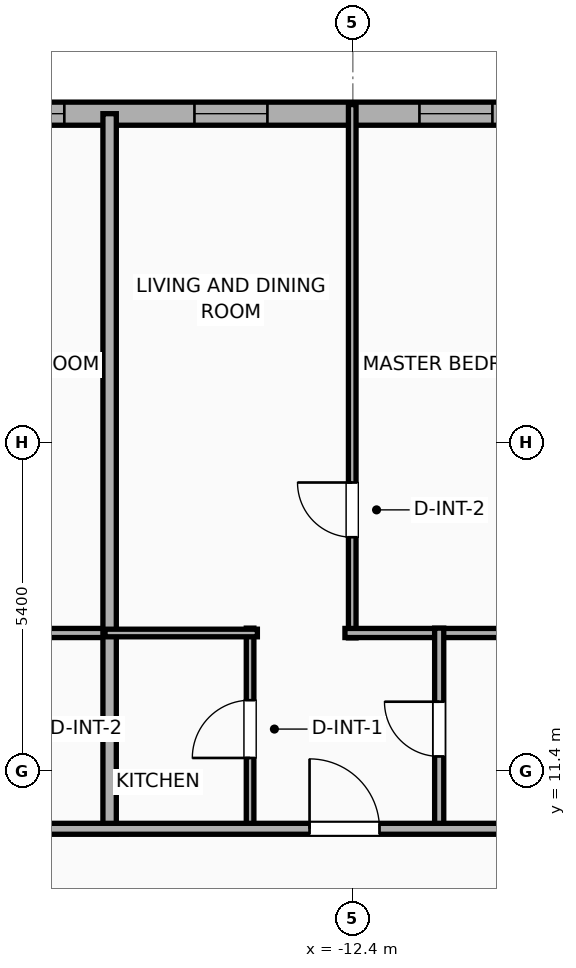
"""IFC4 building model, lengths in metres.
Left out: names, types, materials, properties, quantities, classifications, styles, units other than length and angle.
Written with IfcOpenShell. Run it as: python <this file> out.ifc"""

import sys

from ifc_helpers import new_model, si_unit, direction, frame, frame_2d, origin, place, context, subcontext, project, spatial, rectangle, extrude, element, fill, save


model = new_model("IFC4")
c1 = context("Model", 3, precision=1e-05, world=origin(), true_north=direction((0.0, 1.0)))
c2 = subcontext(c1, "Body", "Model", "MODEL_VIEW")
j1 = project(units=[si_unit("LENGTHUNIT", "METRE"), si_unit("PLANEANGLEUNIT", "RADIAN")], contexts=[c1])
p1 = place(None, origin())
s1 = spatial("IfcSite", under=j1, at=p1, CompositionType="ELEMENT")
p2 = place(p1, origin())
s2 = spatial("IfcBuilding", under=s1, at=p2, CompositionType="ELEMENT")
p3 = place(p2, frame((0.0, 0.0, 57.2)))
s3 = spatial("IfcBuildingStorey", under=s2, at=p3, CompositionType="ELEMENT", Elevation=57.2)
p4 = place(p3, frame((-29.581, 22.21, 0.0), z_axis=(0.0, 0.0, 1.0), x_axis=(1.0, 0.0, 0.0)))
e1 = element("IfcWall", 1, at=p4, inside=s3, PredefinedType="ELEMENTEDWALL", context=c2, shape_type="SweptSolid", body=[
    extrude(rectangle(XDim=51.963, YDim=0.38, at=frame_2d((25.981, 0.0))), origin(), (0.0, 0.0, 1.0), 3.65),
])
p5 = place(p4, frame((6.61, 0.0, 0.75)))
e2 = element("IfcOpeningElement", 2, at=p5, cuts=e1, PredefinedType="OPENING", context=c2, shape_type="SweptSolid", body=[
    extrude(rectangle(XDim=2.4, YDim=2.1, at=frame_2d((1.2, 1.05))), frame((0.0, 0.2, 0.0), z_axis=(0.0, -1.0, 0.0), x_axis=(1.0, 0.0, 0.0)), (0.0, 0.0, 1.0), 0.4),
])
p6 = place(p4, frame((24.781, 0.0, 0.75)))
e3 = element("IfcOpeningElement", 3, at=p6, cuts=e1, PredefinedType="OPENING", context=c2, shape_type="SweptSolid", body=[
    extrude(rectangle(XDim=2.4, YDim=2.1, at=frame_2d((1.2, 1.05))), frame((0.0, 0.2, 0.0), z_axis=(0.0, -1.0, 0.0), x_axis=(1.0, 0.0, 0.0)), (0.0, 0.0, 1.0), 0.4),
])
p7 = place(p4, frame((42.952, 0.0, 0.75)))
e4 = element("IfcOpeningElement", 4, at=p7, cuts=e1, PredefinedType="OPENING", context=c2, shape_type="SweptSolid", body=[
    extrude(rectangle(XDim=2.4, YDim=2.1, at=frame_2d((1.2, 1.05))), frame((0.0, 0.2, 0.0), z_axis=(0.0, -1.0, 0.0), x_axis=(1.0, 0.0, 0.0)), (0.0, 0.0, 1.0), 0.4),
])
p8 = place(p4, frame((3.476, 0.0, 0.75)))
e5 = element("IfcOpeningElement", 5, at=p8, cuts=e1, PredefinedType="OPENING", context=c2, shape_type="SweptSolid", body=[
    extrude(rectangle(XDim=1.2, YDim=2.05, at=frame_2d((0.6, 1.025))), frame((0.0, 0.2, 0.0), z_axis=(0.0, -1.0, 0.0), x_axis=(1.0, 0.0, 0.0)), (0.0, 0.0, 1.0), 0.4),
])
p9 = place(p4, frame((11.236, 0.0, 0.75)))
e6 = element("IfcOpeningElement", 6, at=p9, cuts=e1, PredefinedType="OPENING", context=c2, shape_type="SweptSolid", body=[
    extrude(rectangle(XDim=1.2, YDim=2.05, at=frame_2d((0.6, 1.025))), frame((0.0, 0.2, 0.0), z_axis=(0.0, -1.0, 0.0), x_axis=(1.0, 0.0, 0.0)), (0.0, 0.0, 1.0), 0.4),
])
p10 = place(p4, frame((14.576, 0.0, 0.75)))
e7 = element("IfcOpeningElement", 7, at=p10, cuts=e1, PredefinedType="OPENING", context=c2, shape_type="SweptSolid", body=[
    extrude(rectangle(XDim=1.2, YDim=2.05, at=frame_2d((0.6, 1.025))), frame((0.0, 0.2, 0.0), z_axis=(0.0, -1.0, 0.0), x_axis=(1.0, 0.0, 0.0)), (0.0, 0.0, 1.0), 0.4),
])
p11 = place(p4, frame((18.276, 0.0, 0.75)))
e8 = element("IfcOpeningElement", 8, at=p11, cuts=e1, PredefinedType="OPENING", context=c2, shape_type="SweptSolid", body=[
    extrude(rectangle(XDim=1.2, YDim=2.05, at=frame_2d((0.6, 1.025))), frame((0.0, 0.2, 0.0), z_axis=(0.0, -1.0, 0.0), x_axis=(1.0, 0.0, 0.0)), (0.0, 0.0, 1.0), 0.4),
])
p12 = place(p4, frame((21.976, 0.0, 0.75)))
e9 = element("IfcOpeningElement", 9, at=p12, cuts=e1, PredefinedType="OPENING", context=c2, shape_type="SweptSolid", body=[
    extrude(rectangle(XDim=1.2, YDim=2.05, at=frame_2d((0.6, 1.025))), frame((0.0, 0.2, 0.0), z_axis=(0.0, -1.0, 0.0), x_axis=(1.0, 0.0, 0.0)), (0.0, 0.0, 1.0), 0.4),
])
p13 = place(p4, frame((29.136, 0.0, 0.75)))
e10 = element("IfcOpeningElement", 10, at=p13, cuts=e1, PredefinedType="OPENING", context=c2, shape_type="SweptSolid", body=[
    extrude(rectangle(XDim=1.2, YDim=2.05, at=frame_2d((0.6, 1.025))), frame((0.0, 0.2, 0.0), z_axis=(0.0, -1.0, 0.0), x_axis=(1.0, 0.0, 0.0)), (0.0, 0.0, 1.0), 0.4),
])
p14 = place(p4, frame((33.076, 0.0, 0.75)))
e11 = element("IfcOpeningElement", 11, at=p14, cuts=e1, PredefinedType="OPENING", context=c2, shape_type="SweptSolid", body=[
    extrude(rectangle(XDim=1.2, YDim=2.05, at=frame_2d((0.6, 1.025))), frame((0.0, 0.2, 0.0), z_axis=(0.0, -1.0, 0.0), x_axis=(1.0, 0.0, 0.0)), (0.0, 0.0, 1.0), 0.4),
])
p15 = place(p4, frame((36.776, 0.0, 0.75)))
e12 = element("IfcOpeningElement", 12, at=p15, cuts=e1, PredefinedType="OPENING", context=c2, shape_type="SweptSolid", body=[
    extrude(rectangle(XDim=1.2, YDim=2.05, at=frame_2d((0.6, 1.025))), frame((0.0, 0.2, 0.0), z_axis=(0.0, -1.0, 0.0), x_axis=(1.0, 0.0, 0.0)), (0.0, 0.0, 1.0), 0.4),
])
p16 = place(p4, frame((39.931, 0.0, 0.75)))
e13 = element("IfcOpeningElement", 13, at=p16, cuts=e1, PredefinedType="OPENING", context=c2, shape_type="SweptSolid", body=[
    extrude(rectangle(XDim=0.85, YDim=2.05, at=frame_2d((0.425, 1.025))), frame((0.0, 0.2, 0.0), z_axis=(0.0, -1.0, 0.0), x_axis=(1.0, 0.0, 0.0)), (0.0, 0.0, 1.0), 0.4),
])
p17 = place(p4, frame((47.469, 0.0, 0.75)))
e14 = element("IfcOpeningElement", 14, at=p17, cuts=e1, PredefinedType="OPENING", context=c2, shape_type="SweptSolid", body=[
    extrude(rectangle(XDim=1.2, YDim=2.05, at=frame_2d((0.6, 1.025))), frame((0.0, 0.2, 0.0), z_axis=(0.0, -1.0, 0.0), x_axis=(1.0, 0.0, 0.0)), (0.0, 0.0, 1.0), 0.4),
])
p18 = place(p4, frame((49.581, 0.0, 0.75)))
e15 = element("IfcOpeningElement", 15, at=p18, cuts=e1, PredefinedType="OPENING", context=c2, shape_type="SweptSolid", body=[
    extrude(rectangle(XDim=1.2, YDim=2.05, at=frame_2d((0.6, 1.025))), frame((0.0, 0.2, 0.0), z_axis=(0.0, -1.0, 0.0), x_axis=(1.0, 0.0, 0.0)), (0.0, 0.0, 1.0), 0.4),
])
p19 = place(p3, frame((-19.93, 13.67, 0.0), z_axis=(0.0, 0.0, 1.0), x_axis=(1.0, 0.0, 0.0)))
e16 = element("IfcWall", 16, at=p19, inside=s3, PredefinedType="PLUMBINGWALL", context=c2, shape_type="SweptSolid", body=[
    extrude(rectangle(XDim=3.605, YDim=0.15, at=frame_2d((1.802, 0.0))), origin(), (0.0, 0.0, 1.0), 3.65),
])
p20 = place(p3, frame((-16.4, 10.37, 0.0), z_axis=(0.0, 0.0, 1.0), x_axis=(0.0, 1.0, 0.0)))
e17 = element("IfcWall", 17, at=p20, inside=s3, PredefinedType="PARTITIONING", context=c2, shape_type="SweptSolid", body=[
    extrude(rectangle(XDim=11.84, YDim=0.22, at=frame_2d((5.92, 0.0))), origin(), (0.0, 0.0, 1.0), 3.65),
])
p21 = place(p3, frame((-12.41, 13.59, 0.0), z_axis=(0.0, 0.0, 1.0), x_axis=(0.0, 1.0, 0.0)))
e18 = element("IfcWall", 18, at=p21, inside=s3, PredefinedType="PARTITIONING", context=c2, shape_type="SweptSolid", body=[
    extrude(rectangle(XDim=8.77, YDim=0.125, at=frame_2d((4.385, 0.0))), origin(), (0.0, 0.0, 1.0), 3.65),
])
p22 = place(p21, frame((1.655, 0.0, 0.0)))
e19 = element("IfcOpeningElement", 19, at=p22, cuts=e18, PredefinedType="OPENING", context=c2, shape_type="SweptSolid", body=[
    extrude(rectangle(XDim=0.9, YDim=2.05, at=frame_2d((0.45, 1.025))), frame((0.0, 0.073, 0.0), z_axis=(0.0, -1.0, 0.0), x_axis=(1.0, 0.0, 0.0)), (0.0, 0.0, 1.0), 0.145),
])
p23 = place(p3, frame((-12.53, 13.67, 0.0), z_axis=(0.0, 0.0, 1.0), x_axis=(1.0, 0.0, 0.0)))
e20 = element("IfcWall", 20, at=p23, inside=s3, PredefinedType="PLUMBINGWALL", context=c2, shape_type="SweptSolid", body=[
    extrude(rectangle(XDim=3.605, YDim=0.15, at=frame_2d((1.802, 0.0))), origin(), (0.0, 0.0, 1.0), 3.65),
])
p24 = place(p3, frame((-14.09, 10.43, 0.0), z_axis=(0.0, 0.0, 1.0), x_axis=(0.0, 1.0, 0.0)))
e21 = element("IfcWall", 21, at=p24, inside=s3, PredefinedType="PARTITIONING", context=c2, shape_type="SweptSolid", body=[
    extrude(rectangle(XDim=3.32, YDim=0.125, at=frame_2d((1.66, 0.0))), origin(), (0.0, 0.0, 1.0), 3.65),
])
p25 = place(p24, frame((1.185, 0.0, 0.0)))
e22 = element("IfcOpeningElement", 22, at=p25, cuts=e21, PredefinedType="OPENING", context=c2, shape_type="SweptSolid", body=[
    extrude(rectangle(XDim=0.95, YDim=2.05, at=frame_2d((0.475, 1.025))), frame((0.0, 0.073, 0.0), z_axis=(0.0, -1.0, 0.0), x_axis=(1.0, 0.0, 0.0)), (0.0, 0.0, 1.0), 0.145),
])
p26 = place(p3, frame((-16.475, 13.67, 0.0), z_axis=(0.0, 0.0, 1.0), x_axis=(1.0, 0.0, 0.0)))
e23 = element("IfcWall", 23, at=p26, inside=s3, PredefinedType="PARTITIONING", context=c2, shape_type="SweptSolid", body=[
    extrude(rectangle(XDim=2.505, YDim=0.125, at=frame_2d((1.252, 0.0))), origin(), (0.0, 0.0, 1.0), 3.65),
])
p27 = place(p3, frame((-10.98, 10.43, 0.0), z_axis=(0.0, 0.0, 1.0), x_axis=(0.0, 1.0, 0.0)))
e24 = element("IfcWall", 24, at=p27, inside=s3, PredefinedType="PLUMBINGWALL", context=c2, shape_type="SweptSolid", body=[
    extrude(rectangle(XDim=3.32, YDim=0.15, at=frame_2d((1.66, 0.0))), origin(), (0.0, 0.0, 1.0), 2.94),
])
p28 = place(p27, frame((1.21, 0.0, 0.0)))
e25 = element("IfcOpeningElement", 25, at=p28, cuts=e24, PredefinedType="OPENING", context=c2, shape_type="SweptSolid", body=[
    extrude(rectangle(XDim=0.9, YDim=2.05, at=frame_2d((0.45, 1.025))), frame((0.0, 0.085, 0.0), z_axis=(0.0, -1.0, 0.0), x_axis=(1.0, 0.0, 0.0)), (0.0, 0.0, 1.0), 0.17),
])
p29 = place(p3, frame((-33.41, 10.45, 0.0), z_axis=(0.0, 0.0, 1.0), x_axis=(1.0, 0.0, 0.0)))
e26 = element("IfcWall", 26, at=p29, inside=s3, PredefinedType="PARTITIONING", context=c2, shape_type="SweptSolid", body=[
    extrude(rectangle(XDim=59.62, YDim=0.18, at=frame_2d((29.81, 0.0))), origin(), (0.0, 0.0, 1.0), 3.65),
])
p30 = place(p29, frame((4.529, 0.0, 0.0)))
e27 = element("IfcOpeningElement", 27, at=p30, cuts=e26, PredefinedType="OPENING", context=c2, shape_type="SweptSolid", body=[
    extrude(rectangle(XDim=1.15, YDim=2.05, at=frame_2d((0.575, 1.025))), frame((0.0, 0.1, 0.0), z_axis=(0.0, -1.0, 0.0), x_axis=(1.0, 0.0, 0.0)), (0.0, 0.0, 1.0), 0.2),
])
p31 = place(p29, frame((12.899, 0.0, 0.0)))
e28 = element("IfcOpeningElement", 28, at=p31, cuts=e26, PredefinedType="OPENING", context=c2, shape_type="SweptSolid", body=[
    extrude(rectangle(XDim=1.15, YDim=2.05, at=frame_2d((0.575, 1.025))), frame((0.0, 0.1, 0.0), z_axis=(0.0, -1.0, 0.0), x_axis=(1.0, 0.0, 0.0)), (0.0, 0.0, 1.0), 0.2),
])
p32 = place(p29, frame((20.298, 0.0, 0.0)))
e29 = element("IfcOpeningElement", 29, at=p32, cuts=e26, PredefinedType="OPENING", context=c2, shape_type="SweptSolid", body=[
    extrude(rectangle(XDim=1.15, YDim=2.05, at=frame_2d((0.575, 1.025))), frame((0.0, 0.1, 0.0), z_axis=(0.0, -1.0, 0.0), x_axis=(1.0, 0.0, 0.0)), (0.0, 0.0, 1.0), 0.2),
])
p33 = place(p29, frame((27.703, 0.0, 0.0)))
e30 = element("IfcOpeningElement", 30, at=p33, cuts=e26, PredefinedType="OPENING", context=c2, shape_type="SweptSolid", body=[
    extrude(rectangle(XDim=1.15, YDim=2.05, at=frame_2d((0.575, 1.025))), frame((0.0, 0.1, 0.0), z_axis=(0.0, -1.0, 0.0), x_axis=(1.0, 0.0, 0.0)), (0.0, 0.0, 1.0), 0.2),
])
p34 = place(p29, frame((35.102, 0.0, 0.0)))
e31 = element("IfcOpeningElement", 31, at=p34, cuts=e26, PredefinedType="OPENING", context=c2, shape_type="SweptSolid", body=[
    extrude(rectangle(XDim=1.15, YDim=2.05, at=frame_2d((0.575, 1.025))), frame((0.0, 0.1, 0.0), z_axis=(0.0, -1.0, 0.0), x_axis=(1.0, 0.0, 0.0)), (0.0, 0.0, 1.0), 0.2),
])
p35 = place(p29, frame((42.5, 0.0, 0.0)))
e32 = element("IfcOpeningElement", 32, at=p35, cuts=e26, PredefinedType="OPENING", context=c2, shape_type="SweptSolid", body=[
    extrude(rectangle(XDim=1.15, YDim=2.05, at=frame_2d((0.575, 1.025))), frame((0.0, 0.1, 0.0), z_axis=(0.0, -1.0, 0.0), x_axis=(1.0, 0.0, 0.0)), (0.0, 0.0, 1.0), 0.2),
])
p36 = place(p29, frame((48.099, 0.0, 0.0)))
e33 = element("IfcOpeningElement", 33, at=p36, cuts=e26, PredefinedType="OPENING", context=c2, shape_type="SweptSolid", body=[
    extrude(rectangle(XDim=1.15, YDim=2.05, at=frame_2d((0.575, 1.025))), frame((0.0, 0.1, 0.0), z_axis=(0.0, -1.0, 0.0), x_axis=(1.0, 0.0, 0.0)), (0.0, 0.0, 1.0), 0.2),
])
p37 = place(p29, frame((56.117, 0.0, 0.0)))
e34 = element("IfcOpeningElement", 34, at=p37, cuts=e26, PredefinedType="OPENING", context=c2, shape_type="SweptSolid", body=[
    extrude(rectangle(XDim=0.9, YDim=2.05, at=frame_2d((0.45, 1.025))), frame((0.0, 0.1, 0.0), z_axis=(0.0, -1.0, 0.0), x_axis=(1.0, 0.0, 0.0)), (0.0, 0.0, 1.0), 0.2),
])
p38 = place(p9, origin())
e35 = element("IfcWindow", 35, at=p38, inside=s3, PartitioningType="SINGLE_PANEL", PredefinedType="WINDOW", context=c2, shape_type="SweptSolid", body=[
    extrude(rectangle(XDim=1.2, YDim=2.05, at=frame_2d((0.6, 1.025))), frame((0.0, 0.03, 0.0), z_axis=(0.0, -1.0, 0.0), x_axis=(1.0, 0.0, 0.0)), (0.0, 0.0, 1.0), 0.06),
])
fill(e6, e35)
p39 = place(p10, origin())
e36 = element("IfcWindow", 36, at=p39, inside=s3, PartitioningType="SINGLE_PANEL", PredefinedType="WINDOW", context=c2, shape_type="SweptSolid", body=[
    extrude(rectangle(XDim=1.2, YDim=2.05, at=frame_2d((0.6, 1.025))), frame((0.0, 0.03, 0.0), z_axis=(0.0, -1.0, 0.0), x_axis=(1.0, 0.0, 0.0)), (0.0, 0.0, 1.0), 0.06),
])
fill(e7, e36)
p40 = place(p11, origin())
e37 = element("IfcWindow", 37, at=p40, inside=s3, PartitioningType="SINGLE_PANEL", PredefinedType="WINDOW", context=c2, shape_type="SweptSolid", body=[
    extrude(rectangle(XDim=1.2, YDim=2.05, at=frame_2d((0.6, 1.025))), frame((0.0, 0.03, 0.0), z_axis=(0.0, -1.0, 0.0), x_axis=(1.0, 0.0, 0.0)), (0.0, 0.0, 1.0), 0.06),
])
fill(e8, e37)
p41 = place(p22, origin())
e38 = element("IfcDoor", 38, at=p41, inside=s3, OperationType="SINGLE_SWING_RIGHT", PredefinedType="DOOR", context=c2, shape_type="SweptSolid", body=[
    extrude(rectangle(XDim=0.9, YDim=2.05, at=frame_2d((0.45, 1.025))), frame((0.0, 0.025, 0.0), z_axis=(0.0, -1.0, 0.0), x_axis=(1.0, 0.0, 0.0)), (0.0, 0.0, 1.0), 0.05),
])
fill(e19, e38)
p42 = place(p25, origin())
e39 = element("IfcDoor", 39, at=p42, inside=s3, OperationType="SINGLE_SWING_LEFT", PredefinedType="DOOR", context=c2, shape_type="SweptSolid", body=[
    extrude(rectangle(XDim=0.95, YDim=2.05, at=frame_2d((0.475, 1.025))), frame((0.0, 0.025, 0.0), z_axis=(0.0, -1.0, 0.0), x_axis=(1.0, 0.0, 0.0)), (0.0, 0.0, 1.0), 0.05),
])
fill(e22, e39)
p43 = place(p28, origin())
e40 = element("IfcDoor", 40, at=p43, inside=s3, OperationType="SINGLE_SWING_RIGHT", PredefinedType="DOOR", context=c2, shape_type="SweptSolid", body=[
    extrude(rectangle(XDim=0.9, YDim=2.05, at=frame_2d((0.45, 1.025))), frame((0.0, 0.025, 0.0), z_axis=(0.0, -1.0, 0.0), x_axis=(1.0, 0.0, 0.0)), (0.0, 0.0, 1.0), 0.05),
])
fill(e25, e40)
p44 = place(p32, origin())
e41 = element("IfcDoor", 41, at=p44, inside=s3, OperationType="SINGLE_SWING_LEFT", PredefinedType="DOOR", context=c2, shape_type="SweptSolid", body=[
    extrude(rectangle(XDim=1.15, YDim=2.05, at=frame_2d((0.575, 1.025))), frame((0.0, 0.025, 0.0), z_axis=(0.0, -1.0, 0.0), x_axis=(1.0, 0.0, 0.0)), (0.0, 0.0, 1.0), 0.05),
])
fill(e29, e41)
save(model, sys.argv[1])
